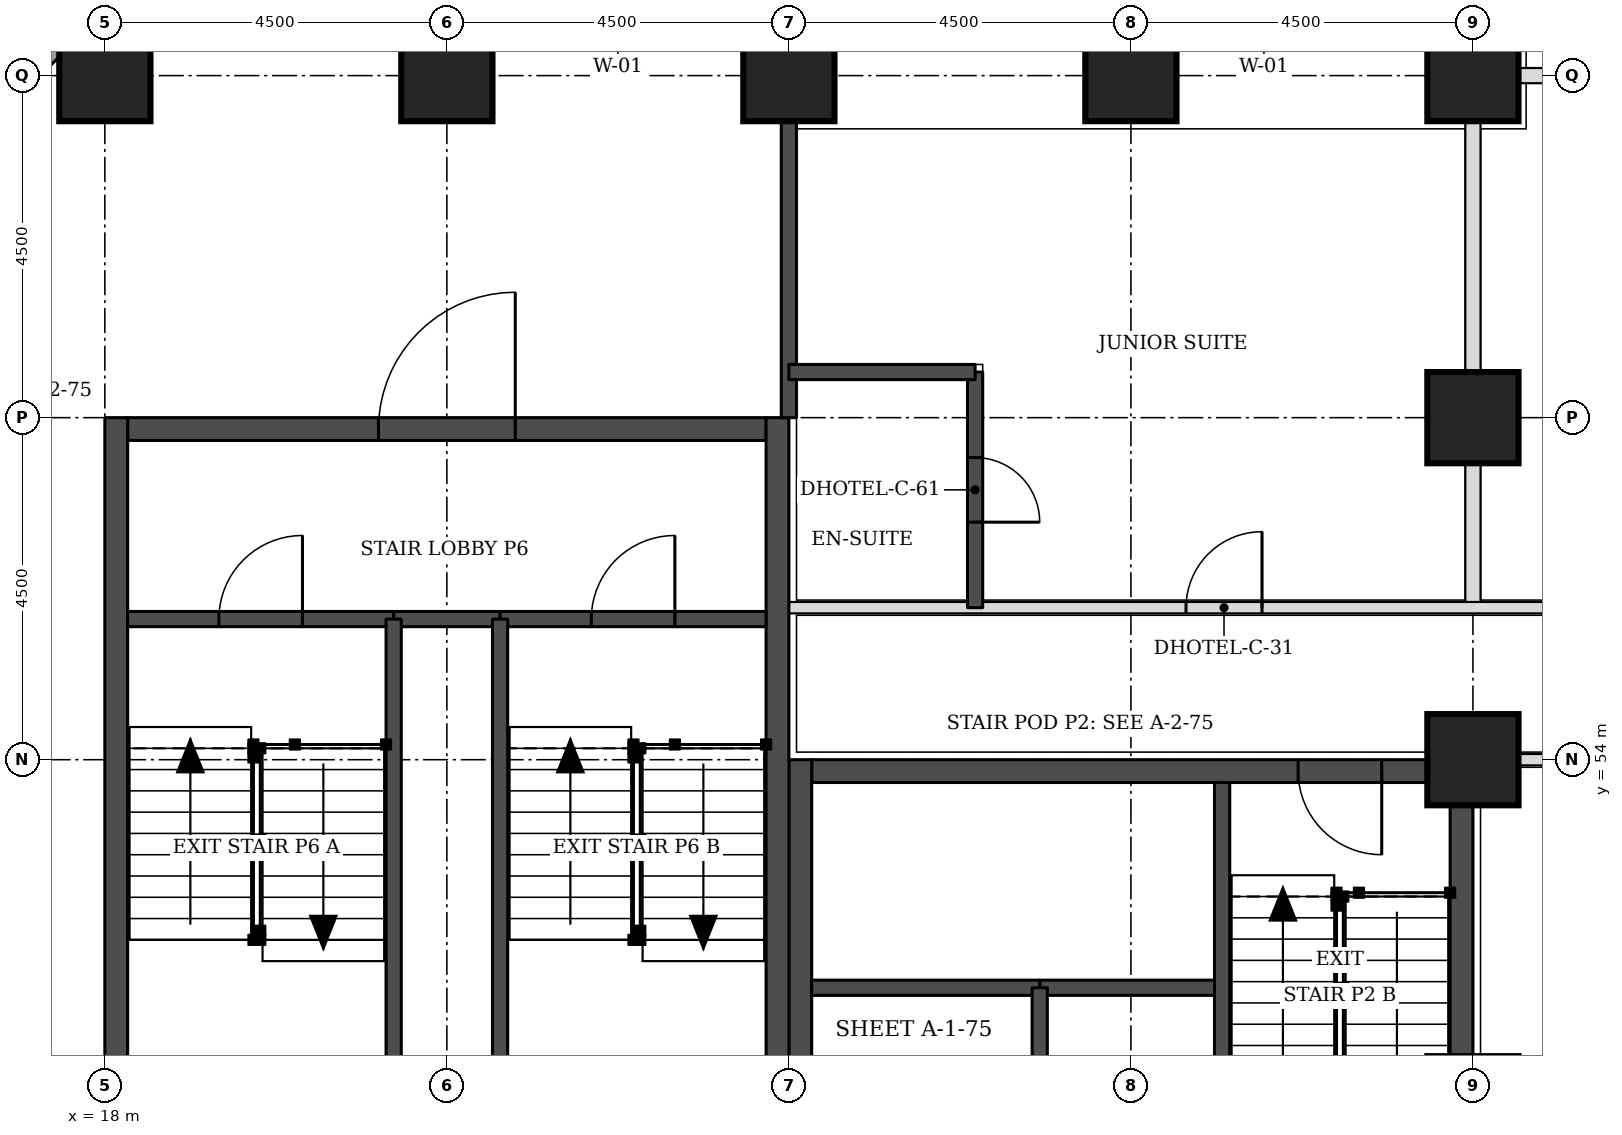
"""IFC4 building model, lengths in metres.
Left out: names, types, materials, properties, quantities, classifications, styles, units other than length and angle.
Written with IfcOpenShell. Run it as: python <this file> out.ifc"""

import sys

from ifc_helpers import new_model, si_unit, direction, frame, frame_2d, origin, origin_2d, place, context, subcontext, project, spatial, rectangle, extrude, element, fill, save


model = new_model("IFC4")
c1 = context("Model", 3, precision=1e-05, world=origin(), true_north=direction((0.0, 1.0)))
c2 = subcontext(c1, "Body", "Model", "MODEL_VIEW")
j1 = project(units=[si_unit("LENGTHUNIT", "METRE"), si_unit("PLANEANGLEUNIT", "RADIAN")], contexts=[c1])
p1 = place(None, origin())
s1 = spatial("IfcSite", under=j1, at=p1, CompositionType="ELEMENT")
p2 = place(p1, origin())
s2 = spatial("IfcBuilding", under=s1, at=p2, CompositionType="ELEMENT")
p3 = place(p2, frame((0.0, 0.0, 33.0)))
s3 = spatial("IfcBuildingStorey", under=s2, at=p3, CompositionType="ELEMENT", Elevation=33.0)
for number, where, z_axis, x_axis in (
    (1, (36.0, 54.0, 0.0), (0.0, 0.0, 1.0), (1.0, 0.0, 0.0)),
    (2, (36.0, 58.5, 0.0), (0.0, 0.0, 1.0), (1.0, 0.0, 0.0)),
    (3, (18.0, 63.0, 0.0), (0.0, 0.0, 1.0), (1.0, 0.0, 0.0)),
    (4, (22.5, 63.0, 0.0), (0.0, 0.0, 1.0), (1.0, 0.0, 0.0)),
    (5, (27.0, 63.0, 0.0), (0.0, 0.0, 1.0), (1.0, 0.0, 0.0)),
    (6, (31.5, 63.0, 0.0), (0.0, 0.0, 1.0), (1.0, 0.0, 0.0)),
    (7, (36.0, 63.0, 0.0), (0.0, 0.0, 1.0), (1.0, 0.0, 0.0)),
):
    element("IfcColumn", number, at=place(p3, frame(where, z_axis=z_axis, x_axis=x_axis)), inside=s3, PredefinedType="COLUMN", context=c2, shape_type="SweptSolid", body=[
        extrude(rectangle(XDim=1.2, YDim=1.2, at=origin_2d()), origin(), (0.0, 0.0, 1.0), 3.3),
    ])
p4 = place(p3, frame((27.3, 53.85, 0.0), z_axis=(0.0, 0.0, 1.0), x_axis=(1.0, 0.0, 0.0)))
e8 = element("IfcWall", 8, at=p4, inside=s3, PredefinedType="SHEAR", context=c2, shape_type="SweptSolid", body=[
    extrude(rectangle(XDim=8.4, YDim=0.3, at=frame_2d((4.2, 0.0))), origin(), (0.0, 0.0, 1.0), 3.3),
])
p5 = place(p4, frame((6.4, 0.0, 0.0)))
e9 = element("IfcOpeningElement", 9, at=p5, cuts=e8, PredefinedType="OPENING", context=c2, shape_type="SweptSolid", body=[
    extrude(rectangle(XDim=1.1, YDim=2.1, at=frame_2d((0.55, 1.05))), frame((0.0, 0.16, 0.0), z_axis=(0.0, -1.0, 0.0), x_axis=(1.0, 0.0, 0.0)), (0.0, 0.0, 1.0), 0.32),
])
p6 = place(p3, frame((27.15, 45.0, 0.0), z_axis=(0.0, 0.0, 1.0), x_axis=(0.0, 1.0, 0.0)))
e10 = element("IfcWall", 10, at=p6, inside=s3, PredefinedType="SHEAR", context=c2, shape_type="SweptSolid", body=[
    extrude(rectangle(XDim=9.0, YDim=0.3, at=frame_2d((4.5, 0.0))), origin(), (0.0, 0.0, 1.0), 3.3),
])
p7 = place(p6, frame((0.4, 0.0, 0.0)))
e11 = element("IfcOpeningElement", 11, at=p7, cuts=e10, PredefinedType="OPENING", context=c2, shape_type="SweptSolid", body=[
    extrude(rectangle(XDim=1.1, YDim=2.1, at=frame_2d((0.55, 1.05))), frame((0.0, 0.16, 0.0), z_axis=(0.0, -1.0, 0.0), x_axis=(1.0, 0.0, 0.0)), (0.0, 0.0, 1.0), 0.32),
])
p8 = place(p3, frame((35.85, 45.0, 0.0), z_axis=(0.0, 0.0, 1.0), x_axis=(0.0, 1.0, 0.0)))
e12 = element("IfcWall", 12, at=p8, inside=s3, PredefinedType="SHEAR", context=c2, shape_type="SweptSolid", body=[
    extrude(rectangle(XDim=9.0, YDim=0.3, at=frame_2d((4.5, 0.0))), origin(), (0.0, 0.0, 1.0), 3.3),
])
p9 = place(p3, frame((18.3, 58.35, 0.0), z_axis=(0.0, 0.0, 1.0), x_axis=(1.0, 0.0, 0.0)))
e13 = element("IfcWall", 13, at=p9, inside=s3, PredefinedType="SHEAR", context=c2, shape_type="SweptSolid", body=[
    extrude(rectangle(XDim=8.4, YDim=0.3, at=frame_2d((4.2, 0.0))), origin(), (0.0, 0.0, 1.0), 3.3),
])
p10 = place(p9, frame((3.3, 0.0, 0.0)))
e14 = element("IfcOpeningElement", 14, at=p10, cuts=e13, PredefinedType="OPENING", context=c2, shape_type="SweptSolid", body=[
    extrude(rectangle(XDim=1.8, YDim=2.1, at=frame_2d((0.9, 1.05))), frame((0.0, 0.16, 0.0), z_axis=(0.0, -1.0, 0.0), x_axis=(1.0, 0.0, 0.0)), (0.0, 0.0, 1.0), 0.32),
])
for number, where, z_axis, x_axis in (
    (15, (18.15, 49.5, 0.0), (0.0, 0.0, 1.0), (0.0, 1.0, 0.0)),
    (16, (26.85, 49.5, 0.0), (0.0, 0.0, 1.0), (0.0, 1.0, 0.0)),
):
    element("IfcWall", number, at=place(p3, frame(where, z_axis=z_axis, x_axis=x_axis)), inside=s3, PredefinedType="SHEAR", context=c2, shape_type="SweptSolid", body=[
        extrude(rectangle(XDim=9.0, YDim=0.3, at=frame_2d((4.5, 0.0))), origin(), (0.0, 0.0, 1.0), 3.3),
    ])
p11 = place(p3, frame((17.73, 63.826, 0.0), z_axis=(0.0, 0.0, 1.0), x_axis=(-0.707106781187, -0.707106781187, 0.0)))
e17 = element("IfcWall", 17, at=p11, inside=s3, PredefinedType="STANDARD", context=c2, shape_type="SweptSolid", body=[
    extrude(rectangle(XDim=7.151, YDim=0.35, at=frame_2d((3.576, 0.0))), origin(), (0.0, 0.0, 1.0), 3.055),
])
p12 = place(p11, frame((1.926, 0.0, 0.8)))
e18 = element("IfcOpeningElement", 18, at=p12, cuts=e17, PredefinedType="OPENING", context=c2, shape_type="SweptSolid", body=[
    extrude(rectangle(XDim=3.3, YDim=1.5, at=frame_2d((1.65, 0.75))), frame((0.0, 0.185, 0.0), z_axis=(0.0, -1.0, 0.0), x_axis=(1.0, 0.0, 0.0)), (0.0, 0.0, 1.0), 0.37),
])
p13 = place(p3, frame((36.0, 56.0, 0.0), z_axis=(0.0, 0.0, 1.0), x_axis=(0.0, 1.0, 0.0)))
e19 = element("IfcWall", 19, at=p13, inside=s3, PredefinedType="PARTITIONING", context=c2, shape_type="SweptSolid", body=[
    extrude(rectangle(XDim=6.4, YDim=0.2, at=frame_2d((3.2, 0.0))), origin(), (0.0, 0.0, 1.0), 2.33),
])
p14 = place(p3, frame((36.6, 63.0, 0.0), z_axis=(0.0, 0.0, 1.0), x_axis=(1.0, 0.0, 0.0)))
e20 = element("IfcWall", 20, at=p14, inside=s3, PredefinedType="PARTITIONING", context=c2, shape_type="SweptSolid", body=[
    extrude(rectangle(XDim=6.4, YDim=0.2, at=frame_2d((3.2, 0.0))), origin(), (0.0, 0.0, 1.0), 3.08),
])
p15 = place(p3, frame((36.05, 54.0, 0.0), z_axis=(0.0, 0.0, 1.0), x_axis=(1.0, 0.0, 0.0)))
e21 = element("IfcWall", 21, at=p15, inside=s3, PredefinedType="PARTITIONING", context=c2, shape_type="SweptSolid", body=[
    extrude(rectangle(XDim=6.95, YDim=0.15, at=frame_2d((3.475, 0.0))), origin(), (0.0, 0.0, 1.0), 3.08),
])
p16 = place(p15, frame((3.0, 0.0, 0.0)))
e22 = element("IfcOpeningElement", 22, at=p16, cuts=e21, PredefinedType="OPENING", context=c2, shape_type="SweptSolid", body=[
    extrude(rectangle(XDim=0.9, YDim=2.1, at=frame_2d((0.45, 1.05))), frame((0.0, 0.085, 0.0), z_axis=(0.0, -1.0, 0.0), x_axis=(1.0, 0.0, 0.0)), (0.0, 0.0, 1.0), 0.17),
])
p17 = place(p3, frame((27.0, 56.0, 0.0), z_axis=(0.0, 0.0, 1.0), x_axis=(1.0, 0.0, 0.0)))
e23 = element("IfcWall", 23, at=p17, inside=s3, PredefinedType="PARTITIONING", context=c2, shape_type="SweptSolid", body=[
    extrude(rectangle(XDim=16.0, YDim=0.15, at=frame_2d((8.0, 0.0))), origin(), (0.0, 0.0, 1.0), 3.08),
])
p18 = place(p17, frame((5.225, 0.0, 0.0)))
e24 = element("IfcOpeningElement", 24, at=p18, cuts=e23, PredefinedType="OPENING", context=c2, shape_type="SweptSolid", body=[
    extrude(rectangle(XDim=1.0, YDim=2.1, at=frame_2d((0.5, 1.05))), frame((0.0, 0.085, 0.0), z_axis=(0.0, -1.0, 0.0), x_axis=(1.0, 0.0, 0.0)), (0.0, 0.0, 1.0), 0.17),
])
p19 = place(p3, frame((27.0, 58.5, 0.0), z_axis=(0.0, 0.0, 1.0), x_axis=(0.0, 1.0, 0.0)))
e25 = element("IfcWall", 25, at=p19, inside=s3, PredefinedType="SOLIDWALL", context=c2, shape_type="SweptSolid", body=[
    extrude(rectangle(XDim=3.9, YDim=0.2, at=frame_2d((1.95, 0.0))), origin(), (0.0, 0.0, 1.0), 3.08),
])
p20 = place(p3, frame((29.45, 56.0, 0.0), z_axis=(0.0, 0.0, 1.0), x_axis=(0.0, 1.0, 0.0)))
e26 = element("IfcWall", 26, at=p20, inside=s3, PredefinedType="SOLIDWALL", context=c2, shape_type="SweptSolid", body=[
    extrude(rectangle(XDim=3.1, YDim=0.2, at=frame_2d((1.55, 0.0))), origin(), (0.0, 0.0, 1.0), 3.08),
])
p21 = place(p20, frame((1.125, 0.0, 0.0)))
e27 = element("IfcOpeningElement", 27, at=p21, cuts=e26, PredefinedType="OPENING", context=c2, shape_type="SweptSolid", body=[
    extrude(rectangle(XDim=0.85, YDim=2.1, at=frame_2d((0.425, 1.05))), frame((0.0, 0.11, 0.0), z_axis=(0.0, -1.0, 0.0), x_axis=(1.0, 0.0, 0.0)), (0.0, 0.0, 1.0), 0.22),
])
p22 = place(p3, frame((27.0, 59.1, 0.0), z_axis=(0.0, 0.0, 1.0), x_axis=(1.0, 0.0, 0.0)))
e28 = element("IfcWall", 28, at=p22, inside=s3, PredefinedType="SOLIDWALL", context=c2, shape_type="SweptSolid", body=[
    extrude(rectangle(XDim=2.45, YDim=0.2, at=frame_2d((1.225, 0.0))), origin(), (0.0, 0.0, 1.0), 3.08),
])
p23 = place(p3, frame((30.3, 51.0, 0.0), z_axis=(0.0, 0.0, 1.0), x_axis=(1.0, 0.0, 0.0)))
e29 = element("IfcWall", 29, at=p23, inside=s3, PredefinedType="SOLIDWALL", context=c2, shape_type="SweptSolid", body=[
    extrude(rectangle(XDim=2.4, YDim=0.2, at=frame_2d((1.2, 0.0))), origin(), (0.0, 0.0, 1.0), 3.3),
])
p24 = place(p3, frame((27.3, 51.0, 0.0), z_axis=(0.0, 0.0, 1.0), x_axis=(1.0, 0.0, 0.0)))
e30 = element("IfcWall", 30, at=p24, inside=s3, PredefinedType="SOLIDWALL", context=c2, shape_type="SweptSolid", body=[
    extrude(rectangle(XDim=3.0, YDim=0.2, at=frame_2d((1.5, 0.0))), origin(), (0.0, 0.0, 1.0), 3.08),
])
for number, where, z_axis, x_axis in (
    (31, (30.3, 45.3, 0.0), (0.0, 0.0, 1.0), (0.0, 1.0, 0.0)),
    (32, (32.7, 48.0, 0.0), (0.0, 0.0, 1.0), (0.0, 1.0, 0.0)),
):
    element("IfcWall", number, at=place(p3, frame(where, z_axis=z_axis, x_axis=x_axis)), inside=s3, PredefinedType="SOLIDWALL", context=c2, shape_type="SweptSolid", body=[
        extrude(rectangle(XDim=5.7, YDim=0.2, at=frame_2d((2.85, 0.0))), origin(), (0.0, 0.0, 1.0), 3.08),
    ])
p25 = place(p3, frame((21.8, 55.85, 0.0), z_axis=(0.0, 0.0, 1.0), x_axis=(1.0, 0.0, 0.0)))
e33 = element("IfcWall", 33, at=p25, inside=s3, PredefinedType="SOLIDWALL", context=c2, shape_type="SweptSolid", body=[
    extrude(rectangle(XDim=1.4, YDim=0.2, at=frame_2d((0.7, 0.0))), origin(), (0.0, 0.0, 1.0), 3.08),
])
p26 = place(p3, frame((18.3, 55.85, 0.0), z_axis=(0.0, 0.0, 1.0), x_axis=(1.0, 0.0, 0.0)))
e34 = element("IfcWall", 34, at=p26, inside=s3, PredefinedType="SOLIDWALL", context=c2, shape_type="SweptSolid", body=[
    extrude(rectangle(XDim=3.5, YDim=0.2, at=frame_2d((1.75, 0.0))), origin(), (0.0, 0.0, 1.0), 3.08),
])
p27 = place(p26, frame((1.2, 0.0, 0.0)))
e35 = element("IfcOpeningElement", 35, at=p27, cuts=e34, PredefinedType="OPENING", context=c2, shape_type="SweptSolid", body=[
    extrude(rectangle(XDim=1.1, YDim=2.1, at=frame_2d((0.55, 1.05))), frame((0.0, 0.11, 0.0), z_axis=(0.0, -1.0, 0.0), x_axis=(1.0, 0.0, 0.0)), (0.0, 0.0, 1.0), 0.22),
])
p28 = place(p3, frame((23.2, 55.85, 0.0), z_axis=(0.0, 0.0, 1.0), x_axis=(1.0, 0.0, 0.0)))
e36 = element("IfcWall", 36, at=p28, inside=s3, PredefinedType="SOLIDWALL", context=c2, shape_type="SweptSolid", body=[
    extrude(rectangle(XDim=3.5, YDim=0.2, at=frame_2d((1.75, 0.0))), origin(), (0.0, 0.0, 1.0), 3.08),
])
p29 = place(p28, frame((1.2, 0.0, 0.0)))
e37 = element("IfcOpeningElement", 37, at=p29, cuts=e36, PredefinedType="OPENING", context=c2, shape_type="SweptSolid", body=[
    extrude(rectangle(XDim=1.1, YDim=2.1, at=frame_2d((0.55, 1.05))), frame((0.0, 0.11, 0.0), z_axis=(0.0, -1.0, 0.0), x_axis=(1.0, 0.0, 0.0)), (0.0, 0.0, 1.0), 0.22),
])
for number, where, z_axis, x_axis in (
    (38, (21.8, 49.8, 0.0), (0.0, 0.0, 1.0), (0.0, 1.0, 0.0)),
    (39, (23.2, 49.8, 0.0), (0.0, 0.0, 1.0), (0.0, 1.0, 0.0)),
):
    element("IfcWall", number, at=place(p3, frame(where, z_axis=z_axis, x_axis=x_axis)), inside=s3, PredefinedType="SOLIDWALL", context=c2, shape_type="SweptSolid", body=[
        extrude(rectangle(XDim=6.05, YDim=0.2, at=frame_2d((3.025, 0.0))), origin(), (0.0, 0.0, 1.0), 3.08),
    ])
p30 = place(p18, origin())
e40 = element("IfcDoor", 40, at=p30, inside=s3, OperationType="SINGLE_SWING_RIGHT", PredefinedType="DOOR", context=c2, shape_type="SweptSolid", body=[
    extrude(rectangle(XDim=1.0, YDim=2.1, at=frame_2d((0.5, 1.05))), frame((0.0, 0.025, 0.0), z_axis=(0.0, -1.0, 0.0), x_axis=(1.0, 0.0, 0.0)), (0.0, 0.0, 1.0), 0.05),
])
fill(e24, e40)
p31 = place(p21, frame((0.85, 0.0, 0.0), z_axis=(0.0, 0.0, 1.0), x_axis=(-1.0, 0.0, 0.0)))
e41 = element("IfcDoor", 41, at=p31, inside=s3, OperationType="SINGLE_SWING_RIGHT", PredefinedType="DOOR", context=c2, shape_type="SweptSolid", body=[
    extrude(rectangle(XDim=0.85, YDim=2.1, at=frame_2d((0.425, 1.05))), frame((0.0, 0.025, 0.0), z_axis=(0.0, -1.0, 0.0), x_axis=(1.0, 0.0, 0.0)), (0.0, 0.0, 1.0), 0.05),
])
fill(e27, e41)
p32 = place(p5, frame((1.1, 0.0, 0.0), z_axis=(0.0, 0.0, 1.0), x_axis=(-1.0, 0.0, 0.0)))
e42 = element("IfcDoor", 42, at=p32, inside=s3, OperationType="SINGLE_SWING_LEFT", PredefinedType="DOOR", context=c2, shape_type="SweptSolid", body=[
    extrude(rectangle(XDim=1.1, YDim=2.1, at=frame_2d((0.55, 1.05))), frame((0.0, 0.025, 0.0), z_axis=(0.0, -1.0, 0.0), x_axis=(1.0, 0.0, 0.0)), (0.0, 0.0, 1.0), 0.05),
])
fill(e9, e42)
p33 = place(p27, origin())
e43 = element("IfcDoor", 43, at=p33, inside=s3, OperationType="SINGLE_SWING_RIGHT", PredefinedType="DOOR", context=c2, shape_type="SweptSolid", body=[
    extrude(rectangle(XDim=1.1, YDim=2.1, at=frame_2d((0.55, 1.05))), frame((0.0, 0.025, 0.0), z_axis=(0.0, -1.0, 0.0), x_axis=(1.0, 0.0, 0.0)), (0.0, 0.0, 1.0), 0.05),
])
fill(e35, e43)
p34 = place(p29, origin())
e44 = element("IfcDoor", 44, at=p34, inside=s3, OperationType="SINGLE_SWING_RIGHT", PredefinedType="DOOR", context=c2, shape_type="SweptSolid", body=[
    extrude(rectangle(XDim=1.1, YDim=2.1, at=frame_2d((0.55, 1.05))), frame((0.0, 0.025, 0.0), z_axis=(0.0, -1.0, 0.0), x_axis=(1.0, 0.0, 0.0)), (0.0, 0.0, 1.0), 0.05),
])
fill(e37, e44)
p35 = place(p10, origin())
e45 = element("IfcDoor", 45, at=p35, inside=s3, OperationType="SINGLE_SWING_RIGHT", PredefinedType="DOOR", context=c2, shape_type="SweptSolid", body=[
    extrude(rectangle(XDim=1.8, YDim=2.1, at=frame_2d((0.9, 1.05))), frame((0.0, 0.025, 0.0), z_axis=(0.0, -1.0, 0.0), x_axis=(1.0, 0.0, 0.0)), (0.0, 0.0, 1.0), 0.05),
])
fill(e14, e45)
save(model, sys.argv[1])
